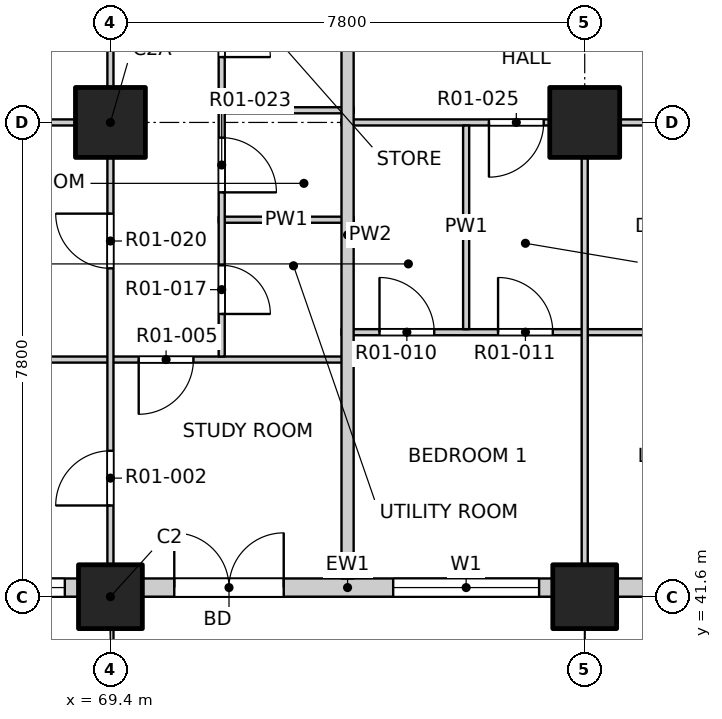
"""IFC4 building model, lengths in metres.
Left out: names, types, materials, properties, quantities, classifications, styles, units other than length and angle.
Written with IfcOpenShell. Run it as: python <this file> out.ifc"""

import sys

from ifc_helpers import new_model, si_unit, direction, frame, frame_2d, origin, origin_2d, place, context, subcontext, project, spatial, rectangle, extrude, element, fill, save


model = new_model("IFC4")
c1 = context("Model", 3, precision=1e-05, world=origin(), true_north=direction((0.0, 1.0)))
c2 = subcontext(c1, "Body", "Model", "MODEL_VIEW")
j1 = project(units=[si_unit("LENGTHUNIT", "METRE"), si_unit("PLANEANGLEUNIT", "RADIAN")], contexts=[c1])
p1 = place(None, origin())
s1 = spatial("IfcSite", under=j1, at=p1, CompositionType="ELEMENT")
p2 = place(p1, origin())
s2 = spatial("IfcBuilding", under=s1, at=p2, CompositionType="ELEMENT")
p3 = place(p2, frame((0.0, 0.0, 19.5)))
s3 = spatial("IfcBuildingStorey", under=s2, at=p3, CompositionType="ELEMENT", Elevation=19.5)
for number, where, z_axis, x_axis in (
    (1, (69.4, 41.6, -0.25), (0.0, 0.0, 1.0), (1.0, 0.0, 0.0)),
    (2, (77.2, 41.6, -0.25), (0.0, 0.0, 1.0), (1.0, 0.0, 0.0)),
):
    element("IfcColumn", number, at=place(p3, frame(where, z_axis=z_axis, x_axis=x_axis)), inside=s3, PredefinedType="COLUMN", context=c2, shape_type="SweptSolid", body=[
        extrude(rectangle(XDim=1.05, YDim=1.05, at=origin_2d()), origin(), (0.0, 0.0, 1.0), 3.4),
    ])
for number, where, z_axis, x_axis in (
    (3, (69.4, 49.4, -0.25), (0.0, 0.0, 1.0), (1.0, 0.0, 0.0)),
    (4, (77.2, 49.4, -0.25), (0.0, 0.0, 1.0), (1.0, 0.0, 0.0)),
):
    element("IfcColumn", number, at=place(p3, frame(where, z_axis=z_axis, x_axis=x_axis)), inside=s3, PredefinedType="COLUMN", context=c2, shape_type="SweptSolid", body=[
        extrude(rectangle(XDim=1.15, YDim=1.15, at=origin_2d()), origin(), (0.0, 0.0, 1.0), 3.4),
    ])
p4 = place(p3, frame((65.5, 41.75, 0.0), z_axis=(0.0, 0.0, 1.0), x_axis=(1.0, 0.0, 0.0)))
e5 = element("IfcWall", 5, at=p4, inside=s3, PredefinedType="SOLIDWALL", context=c2, shape_type="SweptSolid", body=[
    extrude(rectangle(XDim=3.375, YDim=0.3, at=frame_2d((1.688, 0.0))), origin(), (0.0, 0.0, 1.0), 2.7),
])
p5 = place(p4, frame((0.75, 0.0, 0.9)))
e6 = element("IfcOpeningElement", 6, at=p5, cuts=e5, PredefinedType="OPENING", context=c2, shape_type="SweptSolid", body=[
    extrude(rectangle(XDim=2.4, YDim=1.8, at=frame_2d((1.2, 0.9))), frame((0.0, 0.16, 0.0), z_axis=(0.0, -1.0, 0.0), x_axis=(1.0, 0.0, 0.0)), (0.0, 0.0, 1.0), 0.32),
])
p6 = place(p3, frame((69.925, 41.75, 0.0), z_axis=(0.0, 0.0, 1.0), x_axis=(1.0, 0.0, 0.0)))
e7 = element("IfcWall", 7, at=p6, inside=s3, PredefinedType="SOLIDWALL", context=c2, shape_type="SweptSolid", body=[
    extrude(rectangle(XDim=6.75, YDim=0.3, at=frame_2d((3.375, 0.0))), origin(), (0.0, 0.0, 1.0), 2.7),
])
p7 = place(p6, frame((0.525, 0.0, 0.0)))
e8 = element("IfcOpeningElement", 8, at=p7, cuts=e7, PredefinedType="OPENING", context=c2, shape_type="SweptSolid", body=[
    extrude(rectangle(XDim=1.8, YDim=2.4, at=frame_2d((0.9, 1.2))), frame((0.0, 0.16, 0.0), z_axis=(0.0, -1.0, 0.0), x_axis=(1.0, 0.0, 0.0)), (0.0, 0.0, 1.0), 0.32),
])
p8 = place(p6, frame((4.125, 0.0, 0.9)))
e9 = element("IfcOpeningElement", 9, at=p8, cuts=e7, PredefinedType="OPENING", context=c2, shape_type="SweptSolid", body=[
    extrude(rectangle(XDim=2.4, YDim=1.8, at=frame_2d((1.2, 0.9))), frame((0.0, 0.16, 0.0), z_axis=(0.0, -1.0, 0.0), x_axis=(1.0, 0.0, 0.0)), (0.0, 0.0, 1.0), 0.32),
])
p9 = place(p3, frame((77.725, 41.75, 0.0), z_axis=(0.0, 0.0, 1.0), x_axis=(1.0, 0.0, 0.0)))
e10 = element("IfcWall", 10, at=p9, inside=s3, PredefinedType="SOLIDWALL", context=c2, shape_type="SweptSolid", body=[
    extrude(rectangle(XDim=6.75, YDim=0.3, at=frame_2d((3.375, 0.0))), origin(), (0.0, 0.0, 1.0), 2.7),
])
p10 = place(p9, frame((0.525, 0.0, 0.0)))
e11 = element("IfcOpeningElement", 11, at=p10, cuts=e10, PredefinedType="OPENING", context=c2, shape_type="SweptSolid", body=[
    extrude(rectangle(XDim=1.8, YDim=2.4, at=frame_2d((0.9, 1.2))), frame((0.0, 0.16, 0.0), z_axis=(0.0, -1.0, 0.0), x_axis=(1.0, 0.0, 0.0)), (0.0, 0.0, 1.0), 0.32),
])
p11 = place(p9, frame((4.125, 0.0, 0.9)))
e12 = element("IfcOpeningElement", 12, at=p11, cuts=e10, PredefinedType="OPENING", context=c2, shape_type="SweptSolid", body=[
    extrude(rectangle(XDim=2.4, YDim=1.8, at=frame_2d((1.2, 0.9))), frame((0.0, 0.16, 0.0), z_axis=(0.0, -1.0, 0.0), x_axis=(1.0, 0.0, 0.0)), (0.0, 0.0, 1.0), 0.32),
])
p12 = place(p3, frame((61.9, 45.5, 0.0), z_axis=(0.0, 0.0, 1.0), x_axis=(1.0, 0.0, 0.0)))
e13 = element("IfcWall", 13, at=p12, inside=s3, PredefinedType="PARTITIONING", context=c2, shape_type="SweptSolid", body=[
    extrude(rectangle(XDim=11.5, YDim=0.1, at=frame_2d((5.75, 0.0))), origin(), (0.0, 0.0, 1.0), 3.15),
])
p13 = place(p12, frame((7.965, 0.0, 0.0)))
e14 = element("IfcOpeningElement", 14, at=p13, cuts=e13, PredefinedType="OPENING", context=c2, shape_type="SweptSolid", body=[
    extrude(rectangle(XDim=0.9, YDim=2.1, at=frame_2d((0.45, 1.05))), frame((0.0, 0.06, 0.0), z_axis=(0.0, -1.0, 0.0), x_axis=(1.0, 0.0, 0.0)), (0.0, 0.0, 1.0), 0.12),
])
p14 = place(p3, frame((73.2, 45.95, 0.0), z_axis=(0.0, 0.0, 1.0), x_axis=(1.0, 0.0, 0.0)))
e15 = element("IfcWall", 15, at=p14, inside=s3, PredefinedType="PARTITIONING", context=c2, shape_type="SweptSolid", body=[
    extrude(rectangle(XDim=15.8, YDim=0.1, at=frame_2d((7.9, 0.0))), origin(), (0.0, 0.0, 1.0), 3.15),
])
p15 = place(p14, frame((0.625, 0.0, 0.0)))
e16 = element("IfcOpeningElement", 16, at=p15, cuts=e15, PredefinedType="OPENING", context=c2, shape_type="SweptSolid", body=[
    extrude(rectangle(XDim=0.9, YDim=2.1, at=frame_2d((0.45, 1.05))), frame((0.0, 0.06, 0.0), z_axis=(0.0, -1.0, 0.0), x_axis=(1.0, 0.0, 0.0)), (0.0, 0.0, 1.0), 0.12),
])
p16 = place(p14, frame((2.575, 0.0, 0.0)))
e17 = element("IfcOpeningElement", 17, at=p16, cuts=e15, PredefinedType="OPENING", context=c2, shape_type="SweptSolid", body=[
    extrude(rectangle(XDim=0.9, YDim=2.1, at=frame_2d((0.45, 1.05))), frame((0.0, 0.06, 0.0), z_axis=(0.0, -1.0, 0.0), x_axis=(1.0, 0.0, 0.0)), (0.0, 0.0, 1.0), 0.12),
])
p17 = place(p14, frame((5.35, 0.0, 0.0)))
e18 = element("IfcOpeningElement", 18, at=p17, cuts=e15, PredefinedType="OPENING", context=c2, shape_type="SweptSolid", body=[
    extrude(rectangle(XDim=1.2, YDim=2.1, at=frame_2d((0.6, 1.05))), frame((0.0, 0.06, 0.0), z_axis=(0.0, -1.0, 0.0), x_axis=(1.0, 0.0, 0.0)), (0.0, 0.0, 1.0), 0.12),
])
p18 = place(p14, frame((9.25, 0.0, 0.0)))
e19 = element("IfcOpeningElement", 19, at=p18, cuts=e15, PredefinedType="OPENING", context=c2, shape_type="SweptSolid", body=[
    extrude(rectangle(XDim=1.2, YDim=2.1, at=frame_2d((0.6, 1.05))), frame((0.0, 0.06, 0.0), z_axis=(0.0, -1.0, 0.0), x_axis=(1.0, 0.0, 0.0)), (0.0, 0.0, 1.0), 0.12),
])
p19 = place(p14, frame((12.325, 0.0, 0.0)))
e20 = element("IfcOpeningElement", 20, at=p19, cuts=e15, PredefinedType="OPENING", context=c2, shape_type="SweptSolid", body=[
    extrude(rectangle(XDim=0.9, YDim=2.1, at=frame_2d((0.45, 1.05))), frame((0.0, 0.06, 0.0), z_axis=(0.0, -1.0, 0.0), x_axis=(1.0, 0.0, 0.0)), (0.0, 0.0, 1.0), 0.12),
])
p20 = place(p14, frame((14.275, 0.0, 0.0)))
e21 = element("IfcOpeningElement", 21, at=p20, cuts=e15, PredefinedType="OPENING", context=c2, shape_type="SweptSolid", body=[
    extrude(rectangle(XDim=0.9, YDim=2.1, at=frame_2d((0.45, 1.05))), frame((0.0, 0.06, 0.0), z_axis=(0.0, -1.0, 0.0), x_axis=(1.0, 0.0, 0.0)), (0.0, 0.0, 1.0), 0.12),
])
p21 = place(p3, frame((71.18, 47.8, 0.0), z_axis=(0.0, 0.0, 1.0), x_axis=(1.0, 0.0, 0.0)))
e22 = element("IfcWall", 22, at=p21, inside=s3, PredefinedType="PARTITIONING", context=c2, shape_type="SweptSolid", body=[
    extrude(rectangle(XDim=2.22, YDim=0.1, at=frame_2d((1.11, 0.0))), origin(), (0.0, 0.0, 1.0), 3.15),
])
p22 = place(p3, frame((61.9, 49.4, 0.0), z_axis=(0.0, 0.0, 1.0), x_axis=(1.0, 0.0, 0.0)))
e23 = element("IfcWall", 23, at=p22, inside=s3, PredefinedType="PARTITIONING", context=c2, shape_type="SweptSolid", body=[
    extrude(rectangle(XDim=7.55, YDim=0.1, at=frame_2d((3.775, 0.0))), origin(), (0.0, 0.0, 1.0), 2.55),
])
p23 = place(p3, frame((73.2, 49.4, 0.0), z_axis=(0.0, 0.0, 1.0), x_axis=(1.0, 0.0, 0.0)))
e24 = element("IfcWall", 24, at=p23, inside=s3, PredefinedType="PARTITIONING", context=c2, shape_type="SweptSolid", body=[
    extrude(rectangle(XDim=23.6, YDim=0.1, at=frame_2d((11.8, 0.0))), origin(), (0.0, 0.0, 1.0), 3.15),
])
p24 = place(p23, frame((2.425, 0.0, 0.0)))
e25 = element("IfcOpeningElement", 25, at=p24, cuts=e24, PredefinedType="OPENING", context=c2, shape_type="SweptSolid", body=[
    extrude(rectangle(XDim=0.9, YDim=2.1, at=frame_2d((0.45, 1.05))), frame((0.0, 0.06, 0.0), z_axis=(0.0, -1.0, 0.0), x_axis=(1.0, 0.0, 0.0)), (0.0, 0.0, 1.0), 0.12),
])
p25 = place(p23, frame((5.5, 0.0, 0.0)))
e26 = element("IfcOpeningElement", 26, at=p25, cuts=e24, PredefinedType="OPENING", context=c2, shape_type="SweptSolid", body=[
    extrude(rectangle(XDim=0.9, YDim=2.1, at=frame_2d((0.45, 1.05))), frame((0.0, 0.06, 0.0), z_axis=(0.0, -1.0, 0.0), x_axis=(1.0, 0.0, 0.0)), (0.0, 0.0, 1.0), 0.12),
])
p26 = place(p23, frame((9.4, 0.0, 0.0)))
e27 = element("IfcOpeningElement", 27, at=p26, cuts=e24, PredefinedType="OPENING", context=c2, shape_type="SweptSolid", body=[
    extrude(rectangle(XDim=0.9, YDim=2.1, at=frame_2d((0.45, 1.05))), frame((0.0, 0.06, 0.0), z_axis=(0.0, -1.0, 0.0), x_axis=(1.0, 0.0, 0.0)), (0.0, 0.0, 1.0), 0.12),
])
p27 = place(p23, frame((14.275, 0.0, 0.0)))
e28 = element("IfcOpeningElement", 28, at=p27, cuts=e24, PredefinedType="OPENING", context=c2, shape_type="SweptSolid", body=[
    extrude(rectangle(XDim=0.9, YDim=2.1, at=frame_2d((0.45, 1.05))), frame((0.0, 0.06, 0.0), z_axis=(0.0, -1.0, 0.0), x_axis=(1.0, 0.0, 0.0)), (0.0, 0.0, 1.0), 0.12),
])
p28 = place(p23, frame((17.2, 0.0, 0.0)))
e29 = element("IfcOpeningElement", 29, at=p28, cuts=e24, PredefinedType="OPENING", context=c2, shape_type="SweptSolid", body=[
    extrude(rectangle(XDim=0.9, YDim=2.1, at=frame_2d((0.45, 1.05))), frame((0.0, 0.06, 0.0), z_axis=(0.0, -1.0, 0.0), x_axis=(1.0, 0.0, 0.0)), (0.0, 0.0, 1.0), 0.12),
])
p29 = place(p23, frame((22.075, 0.0, 0.0)))
e30 = element("IfcOpeningElement", 30, at=p29, cuts=e24, PredefinedType="OPENING", context=c2, shape_type="SweptSolid", body=[
    extrude(rectangle(XDim=0.9, YDim=2.1, at=frame_2d((0.45, 1.05))), frame((0.0, 0.06, 0.0), z_axis=(0.0, -1.0, 0.0), x_axis=(1.0, 0.0, 0.0)), (0.0, 0.0, 1.0), 0.12),
])
p30 = place(p3, frame((71.18, 49.6, 0.0), z_axis=(0.0, 0.0, 1.0), x_axis=(1.0, 0.0, 0.0)))
e31 = element("IfcWall", 31, at=p30, inside=s3, PredefinedType="PARTITIONING", context=c2, shape_type="SweptSolid", body=[
    extrude(rectangle(XDim=2.22, YDim=0.1, at=frame_2d((1.11, 0.0))), origin(), (0.0, 0.0, 1.0), 3.15),
])
p31 = place(p3, frame((69.4, 41.9, 0.0), z_axis=(0.0, 0.0, 1.0), x_axis=(0.0, 1.0, 0.0)))
e32 = element("IfcWall", 32, at=p31, inside=s3, PredefinedType="PARTITIONING", context=c2, shape_type="SweptSolid", body=[
    extrude(rectangle(XDim=7.5, YDim=0.1, at=frame_2d((3.75, 0.0))), origin(), (0.0, 0.0, 1.0), 2.55),
])
p32 = place(p31, frame((1.2, 0.0, 0.0)))
e33 = element("IfcOpeningElement", 33, at=p32, cuts=e32, PredefinedType="OPENING", context=c2, shape_type="SweptSolid", body=[
    extrude(rectangle(XDim=0.9, YDim=2.1, at=frame_2d((0.45, 1.05))), frame((0.0, 0.06, 0.0), z_axis=(0.0, -1.0, 0.0), x_axis=(1.0, 0.0, 0.0)), (0.0, 0.0, 1.0), 0.12),
])
p33 = place(p31, frame((5.1, 0.0, 0.0)))
e34 = element("IfcOpeningElement", 34, at=p33, cuts=e32, PredefinedType="OPENING", context=c2, shape_type="SweptSolid", body=[
    extrude(rectangle(XDim=0.9, YDim=2.1, at=frame_2d((0.45, 1.05))), frame((0.0, 0.06, 0.0), z_axis=(0.0, -1.0, 0.0), x_axis=(1.0, 0.0, 0.0)), (0.0, 0.0, 1.0), 0.12),
])
p34 = place(p3, frame((69.4, 49.4, 0.0), z_axis=(0.0, 0.0, 1.0), x_axis=(0.0, 1.0, 0.0)))
e35 = element("IfcWall", 35, at=p34, inside=s3, PredefinedType="PARTITIONING", context=c2, shape_type="SweptSolid", body=[
    extrude(rectangle(XDim=31.2, YDim=0.1, at=frame_2d((15.6, 0.0))), origin(), (0.0, 0.0, 1.0), 3.15),
])
p35 = place(p34, frame((1.5, 0.0, 0.0)))
e36 = element("IfcOpeningElement", 36, at=p35, cuts=e35, PredefinedType="OPENING", context=c2, shape_type="SweptSolid", body=[
    extrude(rectangle(XDim=0.9, YDim=2.1, at=frame_2d((0.45, 1.05))), frame((0.0, 0.06, 0.0), z_axis=(0.0, -1.0, 0.0), x_axis=(1.0, 0.0, 0.0)), (0.0, 0.0, 1.0), 0.12),
])
p36 = place(p34, frame((6.225, 0.0, 0.0)))
e37 = element("IfcOpeningElement", 37, at=p36, cuts=e35, PredefinedType="OPENING", context=c2, shape_type="SweptSolid", body=[
    extrude(rectangle(XDim=0.9, YDim=2.1, at=frame_2d((0.45, 1.05))), frame((0.0, 0.06, 0.0), z_axis=(0.0, -1.0, 0.0), x_axis=(1.0, 0.0, 0.0)), (0.0, 0.0, 1.0), 0.12),
])
p37 = place(p34, frame((10.275, 0.0, 0.0)))
e38 = element("IfcOpeningElement", 38, at=p37, cuts=e35, PredefinedType="OPENING", context=c2, shape_type="SweptSolid", body=[
    extrude(rectangle(XDim=0.9, YDim=2.1, at=frame_2d((0.45, 1.05))), frame((0.0, 0.06, 0.0), z_axis=(0.0, -1.0, 0.0), x_axis=(1.0, 0.0, 0.0)), (0.0, 0.0, 1.0), 0.12),
])
p38 = place(p34, frame((13.2, 0.0, 0.0)))
e39 = element("IfcOpeningElement", 39, at=p38, cuts=e35, PredefinedType="OPENING", context=c2, shape_type="SweptSolid", body=[
    extrude(rectangle(XDim=0.9, YDim=2.1, at=frame_2d((0.45, 1.05))), frame((0.0, 0.06, 0.0), z_axis=(0.0, -1.0, 0.0), x_axis=(1.0, 0.0, 0.0)), (0.0, 0.0, 1.0), 0.12),
])
p39 = place(p34, frame((18.075, 0.0, 0.0)))
e40 = element("IfcOpeningElement", 40, at=p39, cuts=e35, PredefinedType="OPENING", context=c2, shape_type="SweptSolid", body=[
    extrude(rectangle(XDim=0.9, YDim=2.1, at=frame_2d((0.45, 1.05))), frame((0.0, 0.06, 0.0), z_axis=(0.0, -1.0, 0.0), x_axis=(1.0, 0.0, 0.0)), (0.0, 0.0, 1.0), 0.12),
])
p40 = place(p34, frame((21.8, 0.0, 0.0)))
e41 = element("IfcOpeningElement", 41, at=p40, cuts=e35, PredefinedType="OPENING", context=c2, shape_type="SweptSolid", body=[
    extrude(rectangle(XDim=0.9, YDim=2.1, at=frame_2d((0.45, 1.05))), frame((0.0, 0.06, 0.0), z_axis=(0.0, -1.0, 0.0), x_axis=(1.0, 0.0, 0.0)), (0.0, 0.0, 1.0), 0.12),
])
p41 = place(p34, frame((24.9, 0.0, 0.0)))
e42 = element("IfcOpeningElement", 42, at=p41, cuts=e35, PredefinedType="OPENING", context=c2, shape_type="SweptSolid", body=[
    extrude(rectangle(XDim=0.9, YDim=2.1, at=frame_2d((0.45, 1.05))), frame((0.0, 0.06, 0.0), z_axis=(0.0, -1.0, 0.0), x_axis=(1.0, 0.0, 0.0)), (0.0, 0.0, 1.0), 0.12),
])
p42 = place(p34, frame((29.6, 0.0, 0.0)))
e43 = element("IfcOpeningElement", 43, at=p42, cuts=e35, PredefinedType="OPENING", context=c2, shape_type="SweptSolid", body=[
    extrude(rectangle(XDim=0.9, YDim=2.1, at=frame_2d((0.45, 1.05))), frame((0.0, 0.06, 0.0), z_axis=(0.0, -1.0, 0.0), x_axis=(1.0, 0.0, 0.0)), (0.0, 0.0, 1.0), 0.12),
])
p43 = place(p3, frame((71.23, 45.55, 0.0), z_axis=(0.0, 0.0, 1.0), x_axis=(0.0, 1.0, 0.0)))
e44 = element("IfcWall", 44, at=p43, inside=s3, PredefinedType="PARTITIONING", context=c2, shape_type="SweptSolid", body=[
    extrude(rectangle(XDim=8.85, YDim=0.1, at=frame_2d((4.425, 0.0))), origin(), (0.0, 0.0, 1.0), 3.15),
])
p44 = place(p43, frame((0.7, 0.0, 0.0)))
e45 = element("IfcOpeningElement", 45, at=p44, cuts=e44, PredefinedType="OPENING", context=c2, shape_type="SweptSolid", body=[
    extrude(rectangle(XDim=0.8, YDim=2.1, at=frame_2d((0.4, 1.05))), frame((0.0, 0.06, 0.0), z_axis=(0.0, -1.0, 0.0), x_axis=(1.0, 0.0, 0.0)), (0.0, 0.0, 1.0), 0.12),
])
p45 = place(p43, frame((2.7, 0.0, 0.0)))
e46 = element("IfcOpeningElement", 46, at=p45, cuts=e44, PredefinedType="OPENING", context=c2, shape_type="SweptSolid", body=[
    extrude(rectangle(XDim=0.9, YDim=2.1, at=frame_2d((0.45, 1.05))), frame((0.0, 0.06, 0.0), z_axis=(0.0, -1.0, 0.0), x_axis=(1.0, 0.0, 0.0)), (0.0, 0.0, 1.0), 0.12),
])
p46 = place(p43, frame((4.925, 0.0, 0.0)))
e47 = element("IfcOpeningElement", 47, at=p46, cuts=e44, PredefinedType="OPENING", context=c2, shape_type="SweptSolid", body=[
    extrude(rectangle(XDim=0.8, YDim=2.1, at=frame_2d((0.4, 1.05))), frame((0.0, 0.06, 0.0), z_axis=(0.0, -1.0, 0.0), x_axis=(1.0, 0.0, 0.0)), (0.0, 0.0, 1.0), 0.12),
])
p47 = place(p43, frame((7.35, 0.0, 0.0)))
e48 = element("IfcOpeningElement", 48, at=p47, cuts=e44, PredefinedType="OPENING", context=c2, shape_type="SweptSolid", body=[
    extrude(rectangle(XDim=0.8, YDim=2.1, at=frame_2d((0.4, 1.05))), frame((0.0, 0.06, 0.0), z_axis=(0.0, -1.0, 0.0), x_axis=(1.0, 0.0, 0.0)), (0.0, 0.0, 1.0), 0.12),
])
p48 = place(p3, frame((73.3, 41.9, 0.0), z_axis=(0.0, 0.0, 1.0), x_axis=(0.0, 1.0, 0.0)))
e49 = element("IfcWall", 49, at=p48, inside=s3, PredefinedType="PARTITIONING", context=c2, shape_type="SweptSolid", body=[
    extrude(rectangle(XDim=11.3, YDim=0.2, at=frame_2d((5.65, 0.0))), origin(), (0.0, 0.0, 1.0), 3.15),
])
p49 = place(p3, frame((75.25, 46.0, 0.0), z_axis=(0.0, 0.0, 1.0), x_axis=(0.0, 1.0, 0.0)))
e50 = element("IfcWall", 50, at=p49, inside=s3, PredefinedType="PARTITIONING", context=c2, shape_type="SweptSolid", body=[
    extrude(rectangle(XDim=3.35, YDim=0.1, at=frame_2d((1.675, 0.0))), origin(), (0.0, 0.0, 1.0), 3.15),
])
p50 = place(p3, frame((77.2, 41.9, 0.0), z_axis=(0.0, 0.0, 1.0), x_axis=(0.0, 1.0, 0.0)))
e51 = element("IfcWall", 51, at=p50, inside=s3, PredefinedType="PARTITIONING", context=c2, shape_type="SweptSolid", body=[
    extrude(rectangle(XDim=7.45, YDim=0.1, at=frame_2d((3.725, 0.0))), origin(), (0.0, 0.0, 1.0), 2.55),
])
p51 = place(p5, origin())
e52 = element("IfcWindow", 52, at=p51, inside=s3, PartitioningType="DOUBLE_PANEL_VERTICAL", PredefinedType="WINDOW", context=c2, shape_type="SweptSolid", body=[
    extrude(rectangle(XDim=2.4, YDim=1.8, at=frame_2d((1.2, 0.9))), frame((0.0, 0.03, 0.0), z_axis=(0.0, -1.0, 0.0), x_axis=(1.0, 0.0, 0.0)), (0.0, 0.0, 1.0), 0.06),
])
fill(e6, e52)
p52 = place(p7, origin())
e53 = element("IfcDoor", 53, at=p52, inside=s3, OperationType="DOUBLE_DOOR_SINGLE_SWING", PredefinedType="DOOR", context=c2, shape_type="SweptSolid", body=[
    extrude(rectangle(XDim=1.8, YDim=2.4, at=frame_2d((0.9, 1.2))), frame((0.0, 0.025, 0.0), z_axis=(0.0, -1.0, 0.0), x_axis=(1.0, 0.0, 0.0)), (0.0, 0.0, 1.0), 0.05),
])
fill(e8, e53)
p53 = place(p8, origin())
e54 = element("IfcWindow", 54, at=p53, inside=s3, PartitioningType="DOUBLE_PANEL_VERTICAL", PredefinedType="WINDOW", context=c2, shape_type="SweptSolid", body=[
    extrude(rectangle(XDim=2.4, YDim=1.8, at=frame_2d((1.2, 0.9))), frame((0.0, 0.03, 0.0), z_axis=(0.0, -1.0, 0.0), x_axis=(1.0, 0.0, 0.0)), (0.0, 0.0, 1.0), 0.06),
])
fill(e9, e54)
p54 = place(p32, origin())
e55 = element("IfcDoor", 55, at=p54, inside=s3, OperationType="SINGLE_SWING_LEFT", PredefinedType="DOOR", context=c2, shape_type="SweptSolid", body=[
    extrude(rectangle(XDim=0.9, YDim=2.1, at=frame_2d((0.45, 1.05))), frame((0.0, 0.025, 0.0), z_axis=(0.0, -1.0, 0.0), x_axis=(1.0, 0.0, 0.0)), (0.0, 0.0, 1.0), 0.05),
])
fill(e33, e55)
p55 = place(p13, origin())
e56 = element("IfcDoor", 56, at=p55, inside=s3, OperationType="SINGLE_SWING_RIGHT", PredefinedType="DOOR", context=c2, shape_type="SweptSolid", body=[
    extrude(rectangle(XDim=0.9, YDim=2.1, at=frame_2d((0.45, 1.05))), frame((0.0, 0.025, 0.0), z_axis=(0.0, -1.0, 0.0), x_axis=(1.0, 0.0, 0.0)), (0.0, 0.0, 1.0), 0.05),
])
fill(e14, e56)
p56 = place(p15, origin())
e57 = element("IfcDoor", 57, at=p56, inside=s3, OperationType="SINGLE_SWING_LEFT", PredefinedType="DOOR", context=c2, shape_type="SweptSolid", body=[
    extrude(rectangle(XDim=0.9, YDim=2.1, at=frame_2d((0.45, 1.05))), frame((0.0, 0.025, 0.0), z_axis=(0.0, -1.0, 0.0), x_axis=(1.0, 0.0, 0.0)), (0.0, 0.0, 1.0), 0.05),
])
fill(e16, e57)
p57 = place(p16, origin())
e58 = element("IfcDoor", 58, at=p57, inside=s3, OperationType="SINGLE_SWING_LEFT", PredefinedType="DOOR", context=c2, shape_type="SweptSolid", body=[
    extrude(rectangle(XDim=0.9, YDim=2.1, at=frame_2d((0.45, 1.05))), frame((0.0, 0.025, 0.0), z_axis=(0.0, -1.0, 0.0), x_axis=(1.0, 0.0, 0.0)), (0.0, 0.0, 1.0), 0.05),
])
fill(e17, e58)
p58 = place(p44, origin())
e59 = element("IfcDoor", 59, at=p58, inside=s3, OperationType="SINGLE_SWING_RIGHT", PredefinedType="DOOR", context=c2, shape_type="SweptSolid", body=[
    extrude(rectangle(XDim=0.8, YDim=2.1, at=frame_2d((0.4, 1.05))), frame((0.0, 0.025, 0.0), z_axis=(0.0, -1.0, 0.0), x_axis=(1.0, 0.0, 0.0)), (0.0, 0.0, 1.0), 0.05),
])
fill(e45, e59)
p59 = place(p33, origin())
e60 = element("IfcDoor", 60, at=p59, inside=s3, OperationType="SINGLE_SWING_RIGHT", PredefinedType="DOOR", context=c2, shape_type="SweptSolid", body=[
    extrude(rectangle(XDim=0.9, YDim=2.1, at=frame_2d((0.45, 1.05))), frame((0.0, 0.025, 0.0), z_axis=(0.0, -1.0, 0.0), x_axis=(1.0, 0.0, 0.0)), (0.0, 0.0, 1.0), 0.05),
])
fill(e34, e60)
p60 = place(p45, origin())
e61 = element("IfcDoor", 61, at=p60, inside=s3, OperationType="SINGLE_SWING_RIGHT", PredefinedType="DOOR", context=c2, shape_type="SweptSolid", body=[
    extrude(rectangle(XDim=0.9, YDim=2.1, at=frame_2d((0.45, 1.05))), frame((0.0, 0.025, 0.0), z_axis=(0.0, -1.0, 0.0), x_axis=(1.0, 0.0, 0.0)), (0.0, 0.0, 1.0), 0.05),
])
fill(e46, e61)
p61 = place(p24, origin())
e62 = element("IfcDoor", 62, at=p61, inside=s3, OperationType="SINGLE_SWING_RIGHT", PredefinedType="DOOR", context=c2, shape_type="SweptSolid", body=[
    extrude(rectangle(XDim=0.9, YDim=2.1, at=frame_2d((0.45, 1.05))), frame((0.0, 0.025, 0.0), z_axis=(0.0, -1.0, 0.0), x_axis=(1.0, 0.0, 0.0)), (0.0, 0.0, 1.0), 0.05),
])
fill(e25, e62)
p62 = place(p46, origin())
e63 = element("IfcDoor", 63, at=p62, inside=s3, OperationType="SINGLE_SWING_RIGHT", PredefinedType="DOOR", context=c2, shape_type="SweptSolid", body=[
    extrude(rectangle(XDim=0.8, YDim=2.1, at=frame_2d((0.4, 1.05))), frame((0.0, 0.025, 0.0), z_axis=(0.0, -1.0, 0.0), x_axis=(1.0, 0.0, 0.0)), (0.0, 0.0, 1.0), 0.05),
])
fill(e47, e63)
save(model, sys.argv[1])
